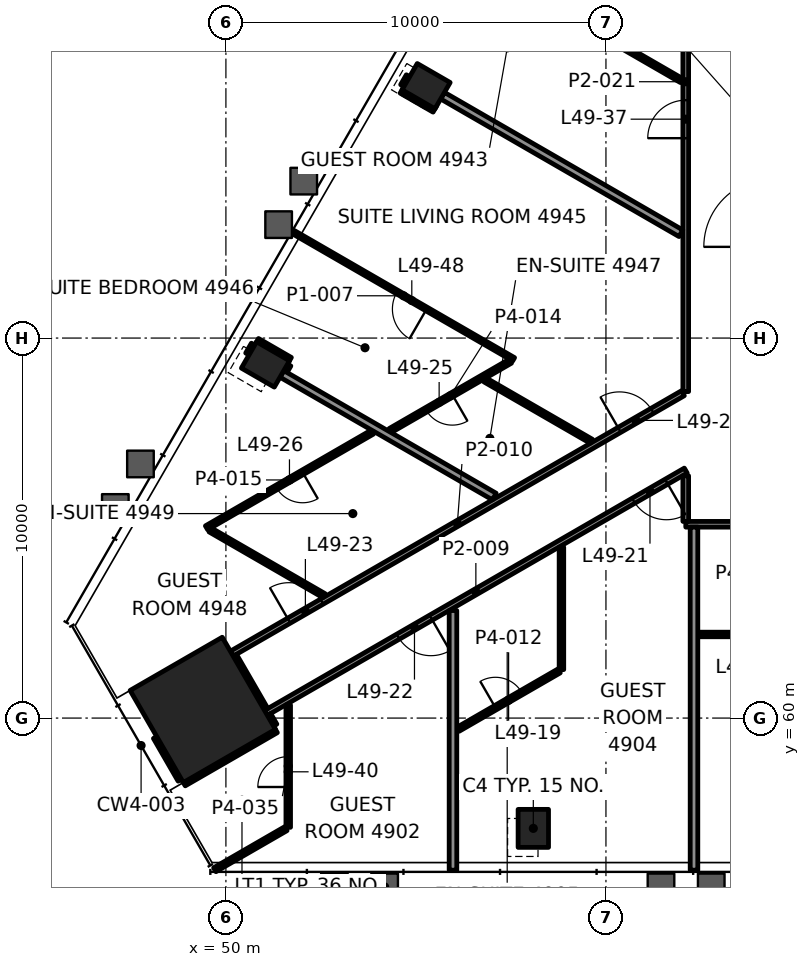
"""IFC4 building model, lengths in metres.
Left out: names, types, materials, properties, quantities, classifications, styles, units other than length and angle.
Written with IfcOpenShell. Run it as: python <this file> out.ifc"""

import sys

from ifc_helpers import new_model, si_unit, direction, frame, frame_2d, origin, origin_2d, place, context, subcontext, project, spatial, rectangle, hollow_rectangle, extrude, element, fill, save


model = new_model("IFC4")
c1 = context("Model", 3, precision=1e-05, world=origin(), true_north=direction((0.0, 1.0)))
c2 = subcontext(c1, "Body", "Model", "MODEL_VIEW")
j1 = project(units=[si_unit("LENGTHUNIT", "METRE"), si_unit("PLANEANGLEUNIT", "RADIAN")], contexts=[c1])
p1 = place(None, origin())
s1 = spatial("IfcSite", under=j1, at=p1, CompositionType="ELEMENT")
p2 = place(p1, origin())
s2 = spatial("IfcBuilding", under=s1, at=p2, CompositionType="ELEMENT")
p3 = place(p2, frame((0.0, 0.0, 210.4)))
s3 = spatial("IfcBuildingStorey", under=s2, at=p3, CompositionType="ELEMENT", Elevation=210.4)
p4 = place(p3, frame((49.392, 60.215, 0.0), z_axis=(0.0, 0.0, 1.0), x_axis=(0.5, -0.866025403784, 0.0)))
e1 = element("IfcColumn", 1, at=p4, inside=s3, PredefinedType="COLUMN", context=c2, shape_type="SweptSolid", body=[
    extrude(rectangle(XDim=2.8, YDim=2.8, at=origin_2d()), origin(), (0.0, 0.0, 1.0), 3.9),
])
for number, where, z_axis, x_axis in (
    (2, (58.089, 57.097, -0.0), (0.0, 0.0, 1.0), (1.0, 0.0, 0.0)),
    (3, (55.268, 76.628, -0.0), (0.0, 0.0, 1.0), (-0.5, -0.866, 0.0)),
    (4, (51.04, 69.306, -0.0), (0.0, 0.0, 1.0), (-0.5, -0.866, 0.0)),
):
    element("IfcColumn", number, at=place(p3, frame(where, z_axis=z_axis, x_axis=x_axis)), inside=s3, PredefinedType="COLUMN", context=c2, shape_type="SweptSolid", body=[
        extrude(hollow_rectangle(XDim=0.8, YDim=1.0, WallThickness=0.05, at=origin_2d()), origin(), (0.0, 0.0, 1.0), 3.9),
    ])
p5 = place(p3, frame((62.427, 62.2, 0.0), z_axis=(0.0, 0.0, 1.0), x_axis=(1.0, 0.0, 0.0)))
e5 = element("IfcWall", 5, at=p5, inside=s3, PredefinedType="PARTITIONING", context=c2, shape_type="SweptSolid", body=[
    extrude(rectangle(XDim=2.674, YDim=0.12, at=frame_2d((1.337, 0.0))), origin(), (0.0, 0.0, 1.0), 3.1),
])
p6 = place(p5, frame((0.937, 0.0, 0.0)))
e6 = element("IfcOpeningElement", 6, at=p6, cuts=e5, PredefinedType="OPENING", context=c2, shape_type="SweptSolid", body=[
    extrude(rectangle(XDim=0.8, YDim=2.1, at=frame_2d((0.4, 1.05))), frame((0.0, 0.07, 0.0), z_axis=(0.0, -1.0, 0.0), x_axis=(1.0, 0.0, 0.0)), (0.0, 0.0, 1.0), 0.14),
])
p7 = place(p3, frame((87.899, 65.1, 0.0), z_axis=(0.0, 0.0, 1.0), x_axis=(-1.0, 0.0, 0.0)))
e7 = element("IfcWall", 7, at=p7, inside=s3, PredefinedType="PARTITIONING", context=c2, shape_type="SweptSolid", body=[
    extrude(rectangle(XDim=25.799, YDim=0.15, at=frame_2d((12.899, 0.0))), origin(), (0.0, 0.0, 1.0), 3.1),
])
p8 = place(p7, frame((0.259, 0.0, 0.0)))
e8 = element("IfcOpeningElement", 8, at=p8, cuts=e7, PredefinedType="OPENING", context=c2, shape_type="SweptSolid", body=[
    extrude(rectangle(XDim=1.0, YDim=2.1, at=frame_2d((0.5, 1.05))), frame((0.0, 0.085, 0.0), z_axis=(0.0, -1.0, 0.0), x_axis=(1.0, 0.0, 0.0)), (0.0, 0.0, 1.0), 0.17),
])
p9 = place(p7, frame((4.641, 0.0, 0.0)))
e9 = element("IfcOpeningElement", 9, at=p9, cuts=e7, PredefinedType="OPENING", context=c2, shape_type="SweptSolid", body=[
    extrude(rectangle(XDim=1.0, YDim=2.1, at=frame_2d((0.5, 1.05))), frame((0.0, 0.085, 0.0), z_axis=(0.0, -1.0, 0.0), x_axis=(1.0, 0.0, 0.0)), (0.0, 0.0, 1.0), 0.17),
])
p10 = place(p7, frame((8.868, 0.0, 0.0)))
e10 = element("IfcOpeningElement", 10, at=p10, cuts=e7, PredefinedType="OPENING", context=c2, shape_type="SweptSolid", body=[
    extrude(rectangle(XDim=1.0, YDim=2.1, at=frame_2d((0.5, 1.05))), frame((0.0, 0.085, 0.0), z_axis=(0.0, -1.0, 0.0), x_axis=(1.0, 0.0, 0.0)), (0.0, 0.0, 1.0), 0.17),
])
p11 = place(p7, frame((13.271, 0.0, 0.0)))
e11 = element("IfcOpeningElement", 11, at=p11, cuts=e7, PredefinedType="OPENING", context=c2, shape_type="SweptSolid", body=[
    extrude(rectangle(XDim=1.0, YDim=2.1, at=frame_2d((0.5, 1.05))), frame((0.0, 0.085, 0.0), z_axis=(0.0, -1.0, 0.0), x_axis=(1.0, 0.0, 0.0)), (0.0, 0.0, 1.0), 0.17),
])
p12 = place(p7, frame((19.612, 0.0, 0.0)))
e12 = element("IfcOpeningElement", 12, at=p12, cuts=e7, PredefinedType="OPENING", context=c2, shape_type="SweptSolid", body=[
    extrude(rectangle(XDim=1.0, YDim=2.1, at=frame_2d((0.5, 1.05))), frame((0.0, 0.085, 0.0), z_axis=(0.0, -1.0, 0.0), x_axis=(1.0, 0.0, 0.0)), (0.0, 0.0, 1.0), 0.17),
])
p13 = place(p3, frame((49.707, 56.009, 0.0), z_axis=(0.0, 0.0, 1.0), x_axis=(0.865990033018, 0.500061258962, 0.0)))
e13 = element("IfcWall", 13, at=p13, inside=s3, PredefinedType="PARTITIONING", context=c2, shape_type="SweptSolid", body=[
    extrude(rectangle(XDim=2.162, YDim=0.12, at=frame_2d((1.081, 0.0))), origin(), (0.0, 0.0, 1.0), 3.1),
])
p14 = place(p3, frame((56.109, 59.706, 0.0), z_axis=(0.0, 0.0, 1.0), x_axis=(0.866042588199, 0.499970234539, 0.0)))
e14 = element("IfcWall", 14, at=p14, inside=s3, PredefinedType="PARTITIONING", context=c2, shape_type="SweptSolid", body=[
    extrude(rectangle(XDim=3.071, YDim=0.12, at=frame_2d((1.535, 0.0))), origin(), (0.0, 0.0, 1.0), 3.1),
])
p15 = place(p14, frame((1.135, 0.0, 0.0)))
e15 = element("IfcOpeningElement", 15, at=p15, cuts=e14, PredefinedType="OPENING", context=c2, shape_type="SweptSolid", body=[
    extrude(rectangle(XDim=0.8, YDim=2.1, at=frame_2d((0.4, 1.05))), frame((0.0, 0.07, 0.0), z_axis=(0.0, -1.0, 0.0), x_axis=(1.0, 0.0, 0.0)), (0.0, 0.0, 1.0), 0.14),
])
p16 = place(p3, frame((48.88, 58.303, 0.0), z_axis=(0.0, 0.0, 1.0), x_axis=(0.865985118016, 0.500069770506, 0.0)))
e16 = element("IfcWall", 16, at=p16, inside=s3, PredefinedType="PARTITIONING", context=c2, shape_type="SweptSolid", body=[
    extrude(rectangle(XDim=2.799, YDim=0.2, at=frame_2d((1.399, 0.0))), origin(), (0.0, 0.0, 1.0), 3.1),
])
p17 = place(p3, frame((62.1, 66.513, 0.0), z_axis=(0.0, 0.0, 1.0), x_axis=(-0.866025886419, -0.499999164051, 0.0)))
e17 = element("IfcWall", 17, at=p17, inside=s3, PredefinedType="PARTITIONING", context=c2, shape_type="SweptSolid", body=[
    extrude(rectangle(XDim=12.754, YDim=0.15, at=frame_2d((6.377, 0.0))), origin(), (0.0, 0.0, 1.0), 2.947),
])
p18 = place(p17, frame((0.587, 0.0, 0.0)))
e18 = element("IfcOpeningElement", 18, at=p18, cuts=e17, PredefinedType="OPENING", context=c2, shape_type="SweptSolid", body=[
    extrude(rectangle(XDim=1.0, YDim=2.1, at=frame_2d((0.5, 1.05))), frame((0.0, 0.085, 0.0), z_axis=(0.0, -1.0, 0.0), x_axis=(1.0, 0.0, 0.0)), (0.0, 0.0, 1.0), 0.17),
])
p19 = place(p17, frame((7.742, 0.0, 0.0)))
e19 = element("IfcOpeningElement", 19, at=p19, cuts=e17, PredefinedType="OPENING", context=c2, shape_type="SweptSolid", body=[
    extrude(rectangle(XDim=1.0, YDim=2.1, at=frame_2d((0.5, 1.05))), frame((0.0, 0.085, 0.0), z_axis=(0.0, -1.0, 0.0), x_axis=(1.0, 0.0, 0.0)), (0.0, 0.0, 1.0), 0.17),
])
p20 = place(p3, frame((50.155, 61.695, 0.0), z_axis=(0.0, 0.0, 1.0), x_axis=(0.8660236305, 0.500003071406, 0.0)))
e20 = element("IfcWall", 20, at=p20, inside=s3, PredefinedType="PARTITIONING", context=c2, shape_type="SweptSolid", body=[
    extrude(rectangle(XDim=13.707, YDim=0.15, at=frame_2d((6.853, 0.0))), origin(), (0.0, 0.0, 1.0), 3.1),
])
p21 = place(p20, frame((1.736, 0.0, 0.0)))
e21 = element("IfcOpeningElement", 21, at=p21, cuts=e20, PredefinedType="OPENING", context=c2, shape_type="SweptSolid", body=[
    extrude(rectangle(XDim=1.0, YDim=2.1, at=frame_2d((0.5, 1.05))), frame((0.0, 0.085, 0.0), z_axis=(0.0, -1.0, 0.0), x_axis=(1.0, 0.0, 0.0)), (0.0, 0.0, 1.0), 0.17),
])
p22 = place(p20, frame((11.777, 0.0, 0.0)))
e22 = element("IfcOpeningElement", 22, at=p22, cuts=e20, PredefinedType="OPENING", context=c2, shape_type="SweptSolid", body=[
    extrude(rectangle(XDim=1.0, YDim=2.1, at=frame_2d((0.5, 1.05))), frame((0.0, 0.085, 0.0), z_axis=(0.0, -1.0, 0.0), x_axis=(1.0, 0.0, 0.0)), (0.0, 0.0, 1.0), 0.17),
])
p23 = place(p3, frame((57.486, 69.392, 0.0), z_axis=(0.0, 0.0, 1.0), x_axis=(-0.866029747927, -0.499992475648, 0.0)))
e23 = element("IfcWall", 23, at=p23, inside=s3, PredefinedType="PARTITIONING", context=c2, shape_type="SweptSolid", body=[
    extrude(rectangle(XDim=3.652, YDim=0.12, at=frame_2d((1.826, 0.0))), origin(), (0.0, 0.0, 1.0), 3.1),
])
p24 = place(p23, frame((1.765, 0.0, 0.0)))
e24 = element("IfcOpeningElement", 24, at=p24, cuts=e23, PredefinedType="OPENING", context=c2, shape_type="SweptSolid", body=[
    extrude(rectangle(XDim=0.8, YDim=2.1, at=frame_2d((0.4, 1.05))), frame((0.0, 0.07, 0.0), z_axis=(0.0, -1.0, 0.0), x_axis=(1.0, 0.0, 0.0)), (0.0, 0.0, 1.0), 0.14),
])
p25 = place(p3, frame((53.854, 67.526, 0.0), z_axis=(0.0, 0.0, 1.0), x_axis=(-0.866025012717, -0.500000677347, 0.0)))
e25 = element("IfcWall", 25, at=p25, inside=s3, PredefinedType="PARTITIONING", context=c2, shape_type="SweptSolid", body=[
    extrude(rectangle(XDim=5.039, YDim=0.12, at=frame_2d((2.519, 0.0))), origin(), (0.0, 0.0, 1.0), 3.1),
])
p26 = place(p25, frame((2.119, 0.0, 0.0)))
e26 = element("IfcOpeningElement", 26, at=p26, cuts=e25, PredefinedType="OPENING", context=c2, shape_type="SweptSolid", body=[
    extrude(rectangle(XDim=0.8, YDim=2.1, at=frame_2d((0.4, 1.05))), frame((0.0, 0.07, 0.0), z_axis=(0.0, -1.0, 0.0), x_axis=(1.0, 0.0, 0.0)), (0.0, 0.0, 1.0), 0.14),
])
p27 = place(p3, frame((51.523, 69.143, 0.0), z_axis=(0.0, 0.0, 1.0), x_axis=(0.500359323436, 0.865817848887, 0.0)))
e27 = element("IfcWall", 27, at=p27, inside=s3, PredefinedType="PARTITIONING", context=c2, shape_type="SweptSolid", body=[
    extrude(rectangle(XDim=0.199, YDim=0.2, at=frame_2d((0.1, 0.0))), origin(), (0.0, 0.0, 1.0), 3.1),
])
p28 = place(p3, frame((50.607, 69.556, 0.0), z_axis=(0.0, 0.0, 1.0), x_axis=(0.49965177357, 0.866226359082, 0.0)))
e28 = element("IfcWall", 28, at=p28, inside=s3, PredefinedType="PARTITIONING", context=c2, shape_type="SweptSolid", body=[
    extrude(rectangle(XDim=0.299, YDim=0.2, at=frame_2d((0.149, 0.0))), origin(), (0.0, 0.0, 1.0), 3.1),
])
p29 = place(p3, frame((54.685, 76.619, 0.0), z_axis=(0.0, 0.0, 1.0), x_axis=(0.499816412211, 0.866131372301, 0.0)))
e29 = element("IfcWall", 29, at=p29, inside=s3, PredefinedType="PARTITIONING", context=c2, shape_type="SweptSolid", body=[
    extrude(rectangle(XDim=0.3, YDim=0.2, at=frame_2d((0.15, 0.0))), origin(), (0.0, 0.0, 1.0), 3.1),
])
p30 = place(p3, frame((62.317, 55.998, 0.0), z_axis=(0.0, 0.0, 1.0), x_axis=(0.0, 1.0, 0.0)))
e30 = element("IfcWall", 30, at=p30, inside=s3, PredefinedType="PARTITIONING", context=c2, shape_type="SweptSolid", body=[
    extrude(rectangle(XDim=9.027, YDim=0.2, at=frame_2d((4.514, 0.0))), origin(), (0.0, 0.0, 1.0), 3.022),
])
p31 = place(p3, frame((62.1, 65.176, 0.0), z_axis=(0.0, 0.0, 1.0), x_axis=(0.0, 1.0, 0.0)))
e31 = element("IfcWall", 31, at=p31, inside=s3, PredefinedType="PARTITIONING", context=c2, shape_type="SweptSolid", body=[
    extrude(rectangle(XDim=1.201, YDim=0.15, at=frame_2d((0.6, 0.0))), origin(), (0.0, 0.0, 1.0), 2.947),
])
p32 = place(p3, frame((62.1, 68.591, 0.0), z_axis=(0.0, 0.0, 1.0), x_axis=(0.0, 1.0, 0.0)))
e32 = element("IfcWall", 32, at=p32, inside=s3, PredefinedType="PARTITIONING", context=c2, shape_type="SweptSolid", body=[
    extrude(rectangle(XDim=16.309, YDim=0.15, at=frame_2d((8.154, 0.0))), origin(), (0.0, 0.0, 1.0), 3.1),
])
p33 = place(p32, frame((6.668, 0.0, 0.0)))
e33 = element("IfcOpeningElement", 33, at=p33, cuts=e32, PredefinedType="OPENING", context=c2, shape_type="SweptSolid", body=[
    extrude(rectangle(XDim=1.0, YDim=2.1, at=frame_2d((0.5, 1.05))), frame((0.0, 0.085, 0.0), z_axis=(0.0, -1.0, 0.0), x_axis=(1.0, 0.0, 0.0)), (0.0, 0.0, 1.0), 0.17),
])
p34 = place(p32, frame((13.991, 0.0, 0.0)))
e34 = element("IfcOpeningElement", 34, at=p34, cuts=e32, PredefinedType="OPENING", context=c2, shape_type="SweptSolid", body=[
    extrude(rectangle(XDim=1.0, YDim=2.1, at=frame_2d((0.5, 1.05))), frame((0.0, 0.085, 0.0), z_axis=(0.0, -1.0, 0.0), x_axis=(1.0, 0.0, 0.0)), (0.0, 0.0, 1.0), 0.17),
])
p35 = place(p3, frame((58.829, 61.276, 0.0), z_axis=(0.0, 0.0, 1.0), x_axis=(0.0, 1.0, 0.0)))
e35 = element("IfcWall", 35, at=p35, inside=s3, PredefinedType="PARTITIONING", context=c2, shape_type="SweptSolid", body=[
    extrude(rectangle(XDim=3.222, YDim=0.12, at=frame_2d((1.611, 0.0))), origin(), (0.0, 0.0, 1.0), 2.947),
])
p36 = place(p3, frame((55.975, 55.998, 0.0), z_axis=(0.0, 0.0, 1.0), x_axis=(0.0, 1.0, 0.0)))
e36 = element("IfcWall", 36, at=p36, inside=s3, PredefinedType="PARTITIONING", context=c2, shape_type="SweptSolid", body=[
    extrude(rectangle(XDim=6.832, YDim=0.2, at=frame_2d((3.416, 0.0))), origin(), (0.0, 0.0, 1.0), 3.1),
])
p37 = place(p3, frame((51.64, 57.125, 0.0), z_axis=(0.0, 0.0, 1.0), x_axis=(0.0, 1.0, 0.0)))
e37 = element("IfcWall", 37, at=p37, inside=s3, PredefinedType="PARTITIONING", context=c2, shape_type="SweptSolid", body=[
    extrude(rectangle(XDim=3.222, YDim=0.12, at=frame_2d((1.611, 0.0))), origin(), (0.0, 0.0, 1.0), 3.1),
])
p38 = place(p37, frame((1.061, 0.0, 0.0)))
e38 = element("IfcOpeningElement", 38, at=p38, cuts=e37, PredefinedType="OPENING", context=c2, shape_type="SweptSolid", body=[
    extrude(rectangle(XDim=0.8, YDim=2.1, at=frame_2d((0.4, 1.05))), frame((0.0, 0.07, 0.0), z_axis=(0.0, -1.0, 0.0), x_axis=(1.0, 0.0, 0.0)), (0.0, 0.0, 1.0), 0.14),
])
p39 = place(p3, frame((51.254, 59.79, 0.0), z_axis=(0.0, 0.0, 1.0), x_axis=(-0.499939380126, 0.866060399857, 0.0)))
e39 = element("IfcWall", 39, at=p39, inside=s3, PredefinedType="PARTITIONING", context=c2, shape_type="SweptSolid", body=[
    extrude(rectangle(XDim=0.325, YDim=0.2, at=frame_2d((0.162, 0.0))), origin(), (0.0, 0.0, 1.0), 3.1),
])
p40 = place(p3, frame((48.829, 58.39, 0.0), z_axis=(0.0, 0.0, 1.0), x_axis=(-0.500080332001, 0.865979019114, 0.0)))
e40 = element("IfcWall", 40, at=p40, inside=s3, PredefinedType="PARTITIONING", context=c2, shape_type="SweptSolid", body=[
    extrude(rectangle(XDim=1.299, YDim=0.2, at=frame_2d((0.649, 0.0))), origin(), (0.0, 0.0, 1.0), 3.1),
])
p41 = place(p3, frame((61.99, 76.775, 0.0), z_axis=(0.0, 0.0, 1.0), x_axis=(-0.866010186656, 0.500026355914, 0.0)))
e41 = element("IfcWall", 41, at=p41, inside=s3, PredefinedType="PARTITIONING", context=c2, shape_type="SweptSolid", body=[
    extrude(rectangle(XDim=3.222, YDim=0.12, at=frame_2d((1.611, 0.0))), origin(), (0.0, 0.0, 1.0), 3.1),
])
p42 = place(p3, frame((61.973, 72.757, 0.0), z_axis=(0.0, 0.0, 1.0), x_axis=(-0.866027278279, 0.499996753267, 0.0)))
e42 = element("IfcWall", 42, at=p42, inside=s3, PredefinedType="PARTITIONING", context=c2, shape_type="SweptSolid", body=[
    extrude(rectangle(XDim=7.242, YDim=0.2, at=frame_2d((3.621, 0.0))), origin(), (0.0, 0.0, 1.0), 3.1),
])
p43 = place(p3, frame((55.501, 76.032, 0.0), z_axis=(0.0, 0.0, 1.0), x_axis=(-0.866010750942, 0.50002537861, 0.0)))
e43 = element("IfcWall", 43, at=p43, inside=s3, PredefinedType="PARTITIONING", context=c2, shape_type="SweptSolid", body=[
    extrude(rectangle(XDim=1.0, YDim=0.2, at=frame_2d((0.5, 0.0))), origin(), (0.0, 0.0, 1.0), 3.022),
])
p44 = place(p3, frame((57.571, 69.441, 0.0), z_axis=(0.0, 0.0, 1.0), x_axis=(-0.866019636692, 0.500009988763, 0.0)))
e44 = element("IfcWall", 44, at=p44, inside=s3, PredefinedType="PARTITIONING", context=c2, shape_type="SweptSolid", body=[
    extrude(rectangle(XDim=6.688, YDim=0.1, at=frame_2d((3.344, 0.0))), origin(), (0.0, 0.0, 1.0), 3.022),
])
p45 = place(p44, frame((2.644, 0.0, 0.0)))
e45 = element("IfcOpeningElement", 45, at=p45, cuts=e44, PredefinedType="OPENING", context=c2, shape_type="SweptSolid", body=[
    extrude(rectangle(XDim=0.9, YDim=2.1, at=frame_2d((0.45, 1.05))), frame((0.0, 0.06, 0.0), z_axis=(0.0, -1.0, 0.0), x_axis=(1.0, 0.0, 0.0)), (0.0, 0.0, 1.0), 0.12),
])
p46 = place(p3, frame((59.615, 67.283, 0.0), z_axis=(0.0, 0.0, 1.0), x_axis=(-0.866000447062, 0.500043223821, 0.0)))
e46 = element("IfcWall", 46, at=p46, inside=s3, PredefinedType="PARTITIONING", context=c2, shape_type="SweptSolid", body=[
    extrude(rectangle(XDim=3.228, YDim=0.12, at=frame_2d((1.614, 0.0))), origin(), (0.0, 0.0, 1.0), 3.1),
])
p47 = place(p3, frame((51.673, 69.403, 0.0), z_axis=(0.0, 0.0, 1.0), x_axis=(-0.866039090965, 0.499976292358, 0.0)))
e47 = element("IfcWall", 47, at=p47, inside=s3, PredefinedType="PARTITIONING", context=c2, shape_type="SweptSolid", body=[
    extrude(rectangle(XDim=0.999, YDim=0.2, at=frame_2d((0.5, 0.0))), origin(), (0.0, 0.0, 1.0), 3.022),
])
p48 = place(p3, frame((57.062, 65.83, 0.0), z_axis=(0.0, 0.0, 1.0), x_axis=(-0.866041300655, 0.499972464802, 0.0)))
e48 = element("IfcWall", 48, at=p48, inside=s3, PredefinedType="PARTITIONING", context=c2, shape_type="SweptSolid", body=[
    extrude(rectangle(XDim=6.452, YDim=0.2, at=frame_2d((3.226, 0.0))), origin(), (0.0, 0.0, 1.0), 3.1),
])
p49 = place(p3, frame((52.581, 63.222, 0.0), z_axis=(0.0, 0.0, 1.0), x_axis=(-0.865997524453, 0.50004828531, 0.0)))
e49 = element("IfcWall", 49, at=p49, inside=s3, PredefinedType="PARTITIONING", context=c2, shape_type="SweptSolid", body=[
    extrude(rectangle(XDim=3.459, YDim=0.12, at=frame_2d((1.729, 0.0))), origin(), (0.0, 0.0, 1.0), 3.1),
])
p50 = place(p3, frame((51.017, 60.201, 0.0), z_axis=(0.0, 0.0, 1.0), x_axis=(-0.499991515992, 0.866030301974, 0.0)))
e50 = element("IfcWall", 50, at=p50, inside=s3, PredefinedType="PARTITIONING", context=c2, shape_type="SweptSolid", body=[
    extrude(rectangle(XDim=1.649, YDim=0.2, at=frame_2d((0.825, 0.0))), origin(), (0.0, 0.0, 1.0), 2.947),
])
p51 = place(p15, origin())
e51 = element("IfcDoor", 51, at=p51, inside=s3, OperationType="SINGLE_SWING_RIGHT", PredefinedType="DOOR", context=c2, shape_type="SweptSolid", body=[
    extrude(rectangle(XDim=0.8, YDim=2.1, at=frame_2d((0.4, 1.05))), frame((0.0, 0.025, 0.0), z_axis=(0.0, -1.0, 0.0), x_axis=(1.0, 0.0, 0.0)), (0.0, 0.0, 1.0), 0.05),
])
fill(e15, e51)
p52 = place(p18, origin())
e52 = element("IfcDoor", 52, at=p52, inside=s3, OperationType="SINGLE_SWING_RIGHT", PredefinedType="DOOR", context=c2, shape_type="SweptSolid", body=[
    extrude(rectangle(XDim=1.0, YDim=2.1, at=frame_2d((0.5, 1.05))), frame((0.0, 0.025, 0.0), z_axis=(0.0, -1.0, 0.0), x_axis=(1.0, 0.0, 0.0)), (0.0, 0.0, 1.0), 0.05),
])
fill(e18, e52)
p53 = place(p19, origin())
e53 = element("IfcDoor", 53, at=p53, inside=s3, OperationType="SINGLE_SWING_RIGHT", PredefinedType="DOOR", context=c2, shape_type="SweptSolid", body=[
    extrude(rectangle(XDim=1.0, YDim=2.1, at=frame_2d((0.5, 1.05))), frame((0.0, 0.025, 0.0), z_axis=(0.0, -1.0, 0.0), x_axis=(1.0, 0.0, 0.0)), (0.0, 0.0, 1.0), 0.05),
])
fill(e19, e53)
p54 = place(p21, origin())
e54 = element("IfcDoor", 54, at=p54, inside=s3, OperationType="SINGLE_SWING_LEFT", PredefinedType="DOOR", context=c2, shape_type="SweptSolid", body=[
    extrude(rectangle(XDim=1.0, YDim=2.1, at=frame_2d((0.5, 1.05))), frame((0.0, 0.025, 0.0), z_axis=(0.0, -1.0, 0.0), x_axis=(1.0, 0.0, 0.0)), (0.0, 0.0, 1.0), 0.05),
])
fill(e21, e54)
p55 = place(p22, origin())
e55 = element("IfcDoor", 55, at=p55, inside=s3, OperationType="SINGLE_SWING_RIGHT", PredefinedType="DOOR", context=c2, shape_type="SweptSolid", body=[
    extrude(rectangle(XDim=1.0, YDim=2.1, at=frame_2d((0.5, 1.05))), frame((0.0, 0.025, 0.0), z_axis=(0.0, -1.0, 0.0), x_axis=(1.0, 0.0, 0.0)), (0.0, 0.0, 1.0), 0.05),
])
fill(e22, e55)
p56 = place(p24, origin())
e56 = element("IfcDoor", 56, at=p56, inside=s3, OperationType="SINGLE_SWING_LEFT", PredefinedType="DOOR", context=c2, shape_type="SweptSolid", body=[
    extrude(rectangle(XDim=0.8, YDim=2.1, at=frame_2d((0.4, 1.05))), frame((0.0, 0.025, 0.0), z_axis=(0.0, -1.0, 0.0), x_axis=(1.0, 0.0, 0.0)), (0.0, 0.0, 1.0), 0.05),
])
fill(e24, e56)
p57 = place(p26, origin())
e57 = element("IfcDoor", 57, at=p57, inside=s3, OperationType="SINGLE_SWING_LEFT", PredefinedType="DOOR", context=c2, shape_type="SweptSolid", body=[
    extrude(rectangle(XDim=0.8, YDim=2.1, at=frame_2d((0.4, 1.05))), frame((0.0, 0.025, 0.0), z_axis=(0.0, -1.0, 0.0), x_axis=(1.0, 0.0, 0.0)), (0.0, 0.0, 1.0), 0.05),
])
fill(e26, e57)
p58 = place(p33, origin())
e58 = element("IfcDoor", 58, at=p58, inside=s3, OperationType="SINGLE_SWING_RIGHT", PredefinedType="DOOR", context=c2, shape_type="SweptSolid", body=[
    extrude(rectangle(XDim=1.0, YDim=2.1, at=frame_2d((0.5, 1.05))), frame((0.0, 0.025, 0.0), z_axis=(0.0, -1.0, 0.0), x_axis=(1.0, 0.0, 0.0)), (0.0, 0.0, 1.0), 0.05),
])
fill(e33, e58)
p59 = place(p38, origin())
e59 = element("IfcDoor", 59, at=p59, inside=s3, OperationType="SINGLE_SWING_RIGHT", PredefinedType="DOOR", context=c2, shape_type="SweptSolid", body=[
    extrude(rectangle(XDim=0.8, YDim=2.1, at=frame_2d((0.4, 1.05))), frame((0.0, 0.025, 0.0), z_axis=(0.0, -1.0, 0.0), x_axis=(1.0, 0.0, 0.0)), (0.0, 0.0, 1.0), 0.05),
])
fill(e38, e59)
p60 = place(p45, origin())
e60 = element("IfcDoor", 60, at=p60, inside=s3, OperationType="SINGLE_SWING_LEFT", PredefinedType="DOOR", context=c2, shape_type="SweptSolid", body=[
    extrude(rectangle(XDim=0.9, YDim=2.1, at=frame_2d((0.45, 1.05))), frame((0.0, 0.025, 0.0), z_axis=(0.0, -1.0, 0.0), x_axis=(1.0, 0.0, 0.0)), (0.0, 0.0, 1.0), 0.05),
])
fill(e45, e60)
save(model, sys.argv[1])
